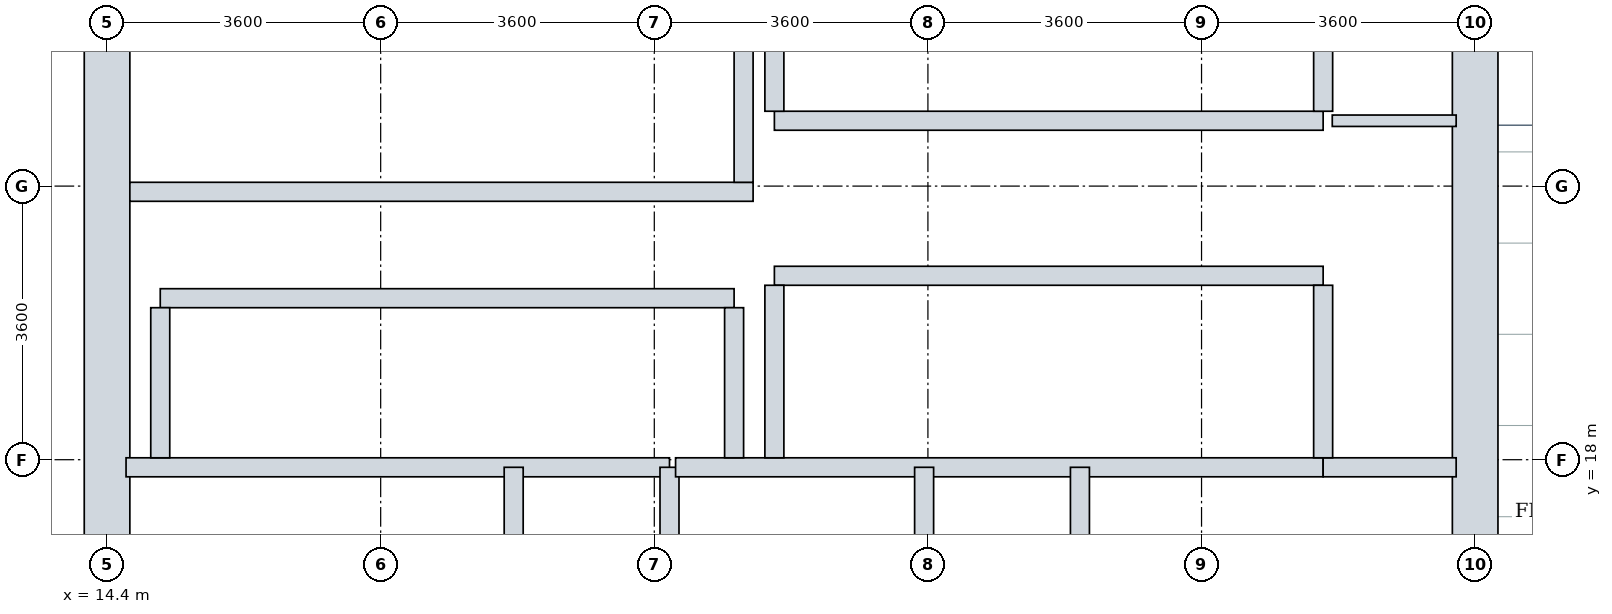
"""IFC4 building model, lengths in metres.
Left out: names, types, materials, properties, quantities, classifications, styles, units other than length and angle.
Written with IfcOpenShell. Run it as: python <this file> out.ifc"""

import sys

from ifc_helpers import new_model, si_unit, direction, frame, frame_2d, origin, place, context, subcontext, project, spatial, rectangle, extrude, element, fill, save


model = new_model("IFC4")
c1 = context("Model", 3, precision=1e-05, world=origin(), true_north=direction((0.0, 1.0)))
c2 = subcontext(c1, "Body", "Model", "MODEL_VIEW")
j1 = project(units=[si_unit("LENGTHUNIT", "METRE"), si_unit("PLANEANGLEUNIT", "RADIAN")], contexts=[c1])
p1 = place(None, origin())
s1 = spatial("IfcSite", under=j1, at=p1, CompositionType="ELEMENT")
p2 = place(p1, origin())
s2 = spatial("IfcBuilding", under=s1, at=p2, CompositionType="ELEMENT")
p3 = place(p2, frame((0.0, 0.0, 24.0)))
s3 = spatial("IfcBuildingStorey", under=s2, at=p3, CompositionType="ELEMENT", Elevation=24.0)
p4 = place(p3, frame((14.4, 10.8, 0.0), z_axis=(0.0, 0.0, 1.0), x_axis=(0.0, 1.0, 0.0)))
e1 = element("IfcWall", 1, at=p4, inside=s3, PredefinedType="SHEAR", context=c2, shape_type="SweptSolid", body=[
    extrude(rectangle(XDim=14.4, YDim=0.6, at=frame_2d((7.2, 0.0))), origin(), (0.0, 0.0, 1.0), 3.65),
])
p5 = place(p4, frame((11.05, 0.0, 0.0)))
e2 = element("IfcOpeningElement", 2, at=p5, cuts=e1, PredefinedType="OPENING", context=c2, shape_type="SweptSolid", body=[
    extrude(rectangle(XDim=1.1, YDim=2.1, at=frame_2d((0.55, 1.05))), frame((0.0, 0.31, 0.0), z_axis=(0.0, -1.0, 0.0), x_axis=(1.0, 0.0, 0.0)), (0.0, 0.0, 1.0), 0.62),
])
p6 = place(p4, frame((4.9, 0.0, 0.0)))
e3 = element("IfcOpeningElement", 3, at=p6, cuts=e1, PredefinedType="OPENING", context=c2, shape_type="SweptSolid", body=[
    extrude(rectangle(XDim=1.2, YDim=2.1, at=frame_2d((0.6, 1.05))), frame((0.0, 0.31, 0.0), z_axis=(0.0, -1.0, 0.0), x_axis=(1.0, 0.0, 0.0)), (0.0, 0.0, 1.0), 0.62),
])
p7 = place(p3, frame((32.4, 10.8, 0.0), z_axis=(0.0, 0.0, 1.0), x_axis=(0.0, 1.0, 0.0)))
e4 = element("IfcWall", 4, at=p7, inside=s3, PredefinedType="SHEAR", context=c2, shape_type="SweptSolid", body=[
    extrude(rectangle(XDim=14.4, YDim=0.6, at=frame_2d((7.2, 0.0))), origin(), (0.0, 0.0, 1.0), 3.65),
])
p8 = place(p7, frame((4.35, 0.0, 0.0)))
e5 = element("IfcOpeningElement", 5, at=p8, cuts=e4, PredefinedType="OPENING", context=c2, shape_type="SweptSolid", body=[
    extrude(rectangle(XDim=1.2, YDim=2.1, at=frame_2d((0.6, 1.05))), frame((0.0, 0.31, 0.0), z_axis=(0.0, -1.0, 0.0), x_axis=(1.0, 0.0, 0.0)), (0.0, 0.0, 1.0), 0.62),
])
p9 = place(p7, frame((10.0, 0.0, 0.0)))
e6 = element("IfcOpeningElement", 6, at=p9, cuts=e4, PredefinedType="OPENING", context=c2, shape_type="SweptSolid", body=[
    extrude(rectangle(XDim=1.2, YDim=2.1, at=frame_2d((0.6, 1.05))), frame((0.0, 0.31, 0.0), z_axis=(0.0, -1.0, 0.0), x_axis=(1.0, 0.0, 0.0)), (0.0, 0.0, 1.0), 0.62),
])
p10 = place(p3, frame((14.7, 21.525, 0.0), z_axis=(0.0, 0.0, 1.0), x_axis=(1.0, 0.0, 0.0)))
e7 = element("IfcWall", 7, at=p10, inside=s3, PredefinedType="SHEAR", context=c2, shape_type="SweptSolid", body=[
    extrude(rectangle(XDim=8.2, YDim=0.25, at=frame_2d((4.1, 0.0))), origin(), (0.0, 0.0, 1.0), 3.65),
])
p11 = place(p3, frame((22.775, 21.65, 0.0), z_axis=(0.0, 0.0, 1.0), x_axis=(0.0, 1.0, 0.0)))
e8 = element("IfcWall", 8, at=p11, inside=s3, PredefinedType="SHEAR", context=c2, shape_type="SweptSolid", body=[
    extrude(rectangle(XDim=2.84, YDim=0.25, at=frame_2d((1.42, 0.0))), origin(), (0.0, 0.0, 1.0), 3.65),
])
p12 = place(p3, frame((14.65, 17.9, 0.0), z_axis=(0.0, 0.0, 1.0), x_axis=(1.0, 0.0, 0.0)))
e9 = element("IfcWall", 9, at=p12, inside=s3, PredefinedType="PARTITIONING", context=c2, shape_type="SweptSolid", body=[
    extrude(rectangle(XDim=7.15, YDim=0.25, at=frame_2d((3.575, 0.0))), origin(), (0.0, 0.0, 1.0), 3.635),
])
p13 = place(p3, frame((19.75, 14.84, 0.0), z_axis=(0.0, 0.0, 1.0), x_axis=(0.0, 1.0, 0.0)))
e10 = element("IfcWall", 10, at=p13, inside=s3, PredefinedType="PARTITIONING", context=c2, shape_type="SweptSolid", body=[
    extrude(rectangle(XDim=3.06, YDim=0.25, at=frame_2d((1.53, 0.0))), origin(), (0.0, 0.0, 1.0), 3.635),
])
p14 = place(p13, frame((0.98, 0.0, 0.0)))
e11 = element("IfcOpeningElement", 11, at=p14, cuts=e10, PredefinedType="OPENING", context=c2, shape_type="SweptSolid", body=[
    extrude(rectangle(XDim=1.1, YDim=2.1, at=frame_2d((0.55, 1.05))), frame((0.0, 0.135, 0.0), z_axis=(0.0, -1.0, 0.0), x_axis=(1.0, 0.0, 0.0)), (0.0, 0.0, 1.0), 0.27),
])
p15 = place(p3, frame((21.8, 14.84, 0.0), z_axis=(0.0, 0.0, 1.0), x_axis=(0.0, 1.0, 0.0)))
e12 = element("IfcWall", 12, at=p15, inside=s3, PredefinedType="PARTITIONING", context=c2, shape_type="SweptSolid", body=[
    extrude(rectangle(XDim=3.06, YDim=0.25, at=frame_2d((1.53, 0.0))), origin(), (0.0, 0.0, 1.0), 3.635),
])
p16 = place(p3, frame((21.88, 17.9, 0.0), z_axis=(0.0, 0.0, 1.0), x_axis=(1.0, 0.0, 0.0)))
e13 = element("IfcWall", 13, at=p16, inside=s3, PredefinedType="PARTITIONING", context=c2, shape_type="SweptSolid", body=[
    extrude(rectangle(XDim=8.52, YDim=0.25, at=frame_2d((4.26, 0.0))), origin(), (0.0, 0.0, 1.0), 3.635),
])
p17 = place(p3, frame((30.4, 17.9, 0.0), z_axis=(0.0, 0.0, 1.0), x_axis=(1.0, 0.0, 0.0)))
e14 = element("IfcWall", 14, at=p17, inside=s3, PredefinedType="PARTITIONING", context=c2, shape_type="SweptSolid", body=[
    extrude(rectangle(XDim=1.75, YDim=0.25, at=frame_2d((0.875, 0.0))), origin(), (0.0, 0.0, 1.0), 3.635),
])
p18 = place(p17, frame((0.32, 0.0, 0.0)))
e15 = element("IfcOpeningElement", 15, at=p18, cuts=e14, PredefinedType="OPENING", context=c2, shape_type="SweptSolid", body=[
    extrude(rectangle(XDim=1.1, YDim=2.1, at=frame_2d((0.55, 1.05))), frame((0.0, 0.135, 0.0), z_axis=(0.0, -1.0, 0.0), x_axis=(1.0, 0.0, 0.0)), (0.0, 0.0, 1.0), 0.27),
])
p19 = place(p3, frame((25.15, 14.84, 0.0), z_axis=(0.0, 0.0, 1.0), x_axis=(0.0, 1.0, 0.0)))
e16 = element("IfcWall", 16, at=p19, inside=s3, PredefinedType="PARTITIONING", context=c2, shape_type="SweptSolid", body=[
    extrude(rectangle(XDim=3.06, YDim=0.25, at=frame_2d((1.53, 0.0))), origin(), (0.0, 0.0, 1.0), 3.635),
])
p20 = place(p3, frame((27.2, 14.84, 0.0), z_axis=(0.0, 0.0, 1.0), x_axis=(0.0, 1.0, 0.0)))
e17 = element("IfcWall", 17, at=p20, inside=s3, PredefinedType="PARTITIONING", context=c2, shape_type="SweptSolid", body=[
    extrude(rectangle(XDim=3.06, YDim=0.25, at=frame_2d((1.53, 0.0))), origin(), (0.0, 0.0, 1.0), 3.635),
])
p21 = place(p20, frame((0.98, 0.0, 0.0)))
e18 = element("IfcOpeningElement", 18, at=p21, cuts=e17, PredefinedType="OPENING", context=c2, shape_type="SweptSolid", body=[
    extrude(rectangle(XDim=1.1, YDim=2.1, at=frame_2d((0.55, 1.05))), frame((0.0, 0.135, 0.0), z_axis=(0.0, -1.0, 0.0), x_axis=(1.0, 0.0, 0.0)), (0.0, 0.0, 1.0), 0.27),
])
p22 = place(p3, frame((15.1, 20.125, 0.0), z_axis=(0.0, 0.0, 1.0), x_axis=(1.0, 0.0, 0.0)))
e19 = element("IfcWall", 19, at=p22, inside=s3, PredefinedType="PARTITIONING", context=c2, shape_type="SweptSolid", body=[
    extrude(rectangle(XDim=7.55, YDim=0.25, at=frame_2d((3.775, 0.0))), origin(), (0.0, 0.0, 1.0), 3.635),
])
p23 = place(p22, frame((0.45, 0.0, 0.0)))
e20 = element("IfcOpeningElement", 20, at=p23, cuts=e19, PredefinedType="OPENING", context=c2, shape_type="SweptSolid", body=[
    extrude(rectangle(XDim=1.1, YDim=2.1, at=frame_2d((0.55, 1.05))), frame((0.0, 0.135, 0.0), z_axis=(0.0, -1.0, 0.0), x_axis=(1.0, 0.0, 0.0)), (0.0, 0.0, 1.0), 0.27),
])
p24 = place(p22, frame((2.3, 0.0, 0.0)))
e21 = element("IfcOpeningElement", 21, at=p24, cuts=e19, PredefinedType="OPENING", context=c2, shape_type="SweptSolid", body=[
    extrude(rectangle(XDim=1.1, YDim=2.1, at=frame_2d((0.55, 1.05))), frame((0.0, 0.135, 0.0), z_axis=(0.0, -1.0, 0.0), x_axis=(1.0, 0.0, 0.0)), (0.0, 0.0, 1.0), 0.27),
])
p25 = place(p22, frame((4.15, 0.0, 0.0)))
e22 = element("IfcOpeningElement", 22, at=p25, cuts=e19, PredefinedType="OPENING", context=c2, shape_type="SweptSolid", body=[
    extrude(rectangle(XDim=1.1, YDim=2.1, at=frame_2d((0.55, 1.05))), frame((0.0, 0.135, 0.0), z_axis=(0.0, -1.0, 0.0), x_axis=(1.0, 0.0, 0.0)), (0.0, 0.0, 1.0), 0.27),
])
p26 = place(p22, frame((6.0, 0.0, 0.0)))
e23 = element("IfcOpeningElement", 23, at=p26, cuts=e19, PredefinedType="OPENING", context=c2, shape_type="SweptSolid", body=[
    extrude(rectangle(XDim=1.1, YDim=2.1, at=frame_2d((0.55, 1.05))), frame((0.0, 0.135, 0.0), z_axis=(0.0, -1.0, 0.0), x_axis=(1.0, 0.0, 0.0)), (0.0, 0.0, 1.0), 0.27),
])
for number, where, z_axis, x_axis in (
    (24, (15.1, 18.025, 0.0), (0.0, 0.0, 1.0), (0.0, 1.0, 0.0)),
    (25, (22.65, 18.025, 0.0), (0.0, 0.0, 1.0), (0.0, 1.0, 0.0)),
):
    element("IfcWall", number, at=place(p3, frame(where, z_axis=z_axis, x_axis=x_axis)), inside=s3, PredefinedType="PARTITIONING", context=c2, shape_type="SweptSolid", body=[
        extrude(rectangle(XDim=1.975, YDim=0.25, at=frame_2d((0.988, 0.0))), origin(), (0.0, 0.0, 1.0), 3.635),
    ])
p27 = place(p3, frame((23.18, 20.42, 0.0), z_axis=(0.0, 0.0, 1.0), x_axis=(1.0, 0.0, 0.0)))
e26 = element("IfcWall", 26, at=p27, inside=s3, PredefinedType="PARTITIONING", context=c2, shape_type="SweptSolid", body=[
    extrude(rectangle(XDim=7.22, YDim=0.25, at=frame_2d((3.61, 0.0))), origin(), (0.0, 0.0, 1.0), 3.635),
])
for number, where, z_axis, x_axis in (
    (27, (23.18, 18.025, 0.0), (0.0, 0.0, 1.0), (0.0, 1.0, 0.0)),
    (28, (30.4, 18.025, 0.0), (0.0, 0.0, 1.0), (0.0, 1.0, 0.0)),
):
    element("IfcWall", number, at=place(p3, frame(where, z_axis=z_axis, x_axis=x_axis)), inside=s3, PredefinedType="PARTITIONING", context=c2, shape_type="SweptSolid", body=[
        extrude(rectangle(XDim=2.27, YDim=0.25, at=frame_2d((1.135, 0.0))), origin(), (0.0, 0.0, 1.0), 3.635),
    ])
p28 = place(p3, frame((23.18, 22.46, 0.0), z_axis=(0.0, 0.0, 1.0), x_axis=(1.0, 0.0, 0.0)))
e29 = element("IfcWall", 29, at=p28, inside=s3, PredefinedType="PARTITIONING", context=c2, shape_type="SweptSolid", body=[
    extrude(rectangle(XDim=7.22, YDim=0.25, at=frame_2d((3.61, 0.0))), origin(), (0.0, 0.0, 1.0), 3.635),
])
for number, where, z_axis, x_axis in (
    (30, (23.18, 22.585, 0.0), (0.0, 0.0, 1.0), (0.0, 1.0, 0.0)),
    (31, (30.4, 22.585, 0.0), (0.0, 0.0, 1.0), (0.0, 1.0, 0.0)),
):
    element("IfcWall", number, at=place(p3, frame(where, z_axis=z_axis, x_axis=x_axis)), inside=s3, PredefinedType="PARTITIONING", context=c2, shape_type="SweptSolid", body=[
        extrude(rectangle(XDim=2.315, YDim=0.25, at=frame_2d((1.157, 0.0))), origin(), (0.0, 0.0, 1.0), 3.635),
    ])
p29 = place(p3, frame((30.52, 22.46, 0.0), z_axis=(0.0, 0.0, 1.0), x_axis=(1.0, 0.0, 0.0)))
e32 = element("IfcWall", 32, at=p29, inside=s3, PredefinedType="PARTITIONING", context=c2, shape_type="SweptSolid", body=[
    extrude(rectangle(XDim=1.63, YDim=0.15, at=frame_2d((0.815, 0.0))), origin(), (0.0, 0.0, 1.0), 3.635),
])
p30 = place(p29, frame((0.38, 0.0, 0.0)))
e33 = element("IfcOpeningElement", 33, at=p30, cuts=e32, PredefinedType="OPENING", context=c2, shape_type="SweptSolid", body=[
    extrude(rectangle(XDim=0.85, YDim=2.1, at=frame_2d((0.425, 1.05))), frame((0.0, 0.085, 0.0), z_axis=(0.0, -1.0, 0.0), x_axis=(1.0, 0.0, 0.0)), (0.0, 0.0, 1.0), 0.17),
])
p31 = place(p5, origin())
e34 = element("IfcDoor", 34, at=p31, inside=s3, OperationType="SINGLE_SWING_RIGHT", PredefinedType="DOOR", context=c2, shape_type="SweptSolid", body=[
    extrude(rectangle(XDim=1.1, YDim=2.1, at=frame_2d((0.55, 1.05))), frame((0.0, 0.025, 0.0), z_axis=(0.0, -1.0, 0.0), x_axis=(1.0, 0.0, 0.0)), (0.0, 0.0, 1.0), 0.05),
])
fill(e2, e34)
p32 = place(p18, origin())
e35 = element("IfcDoor", 35, at=p32, inside=s3, OperationType="SINGLE_SWING_LEFT", PredefinedType="DOOR", context=c2, shape_type="SweptSolid", body=[
    extrude(rectangle(XDim=1.1, YDim=2.1, at=frame_2d((0.55, 1.05))), frame((0.0, 0.025, 0.0), z_axis=(0.0, -1.0, 0.0), x_axis=(1.0, 0.0, 0.0)), (0.0, 0.0, 1.0), 0.05),
])
fill(e15, e35)
p33 = place(p23, origin())
e36 = element("IfcDoor", 36, at=p33, inside=s3, OperationType="SLIDING_TO_LEFT", PredefinedType="DOOR", context=c2, shape_type="SweptSolid", body=[
    extrude(rectangle(XDim=1.1, YDim=2.1, at=frame_2d((0.55, 1.05))), frame((0.0, 0.025, 0.0), z_axis=(0.0, -1.0, 0.0), x_axis=(1.0, 0.0, 0.0)), (0.0, 0.0, 1.0), 0.05),
])
fill(e20, e36)
p34 = place(p24, origin())
e37 = element("IfcDoor", 37, at=p34, inside=s3, OperationType="SLIDING_TO_LEFT", PredefinedType="DOOR", context=c2, shape_type="SweptSolid", body=[
    extrude(rectangle(XDim=1.1, YDim=2.1, at=frame_2d((0.55, 1.05))), frame((0.0, 0.025, 0.0), z_axis=(0.0, -1.0, 0.0), x_axis=(1.0, 0.0, 0.0)), (0.0, 0.0, 1.0), 0.05),
])
fill(e21, e37)
p35 = place(p25, origin())
e38 = element("IfcDoor", 38, at=p35, inside=s3, OperationType="SLIDING_TO_LEFT", PredefinedType="DOOR", context=c2, shape_type="SweptSolid", body=[
    extrude(rectangle(XDim=1.1, YDim=2.1, at=frame_2d((0.55, 1.05))), frame((0.0, 0.025, 0.0), z_axis=(0.0, -1.0, 0.0), x_axis=(1.0, 0.0, 0.0)), (0.0, 0.0, 1.0), 0.05),
])
fill(e22, e38)
p36 = place(p26, origin())
e39 = element("IfcDoor", 39, at=p36, inside=s3, OperationType="SLIDING_TO_LEFT", PredefinedType="DOOR", context=c2, shape_type="SweptSolid", body=[
    extrude(rectangle(XDim=1.1, YDim=2.1, at=frame_2d((0.55, 1.05))), frame((0.0, 0.025, 0.0), z_axis=(0.0, -1.0, 0.0), x_axis=(1.0, 0.0, 0.0)), (0.0, 0.0, 1.0), 0.05),
])
fill(e23, e39)
p37 = place(p9, origin())
e40 = element("IfcDoor", 40, at=p37, inside=s3, OperationType="SINGLE_SWING_RIGHT", PredefinedType="DOOR", context=c2, shape_type="SweptSolid", body=[
    extrude(rectangle(XDim=1.2, YDim=2.1, at=frame_2d((0.6, 1.05))), frame((0.0, 0.025, 0.0), z_axis=(0.0, -1.0, 0.0), x_axis=(1.0, 0.0, 0.0)), (0.0, 0.0, 1.0), 0.05),
])
fill(e6, e40)
p38 = place(p30, origin())
e41 = element("IfcDoor", 41, at=p38, inside=s3, OperationType="SINGLE_SWING_RIGHT", PredefinedType="DOOR", context=c2, shape_type="SweptSolid", body=[
    extrude(rectangle(XDim=0.85, YDim=2.1, at=frame_2d((0.425, 1.05))), frame((0.0, 0.025, 0.0), z_axis=(0.0, -1.0, 0.0), x_axis=(1.0, 0.0, 0.0)), (0.0, 0.0, 1.0), 0.05),
])
fill(e33, e41)
save(model, sys.argv[1])
